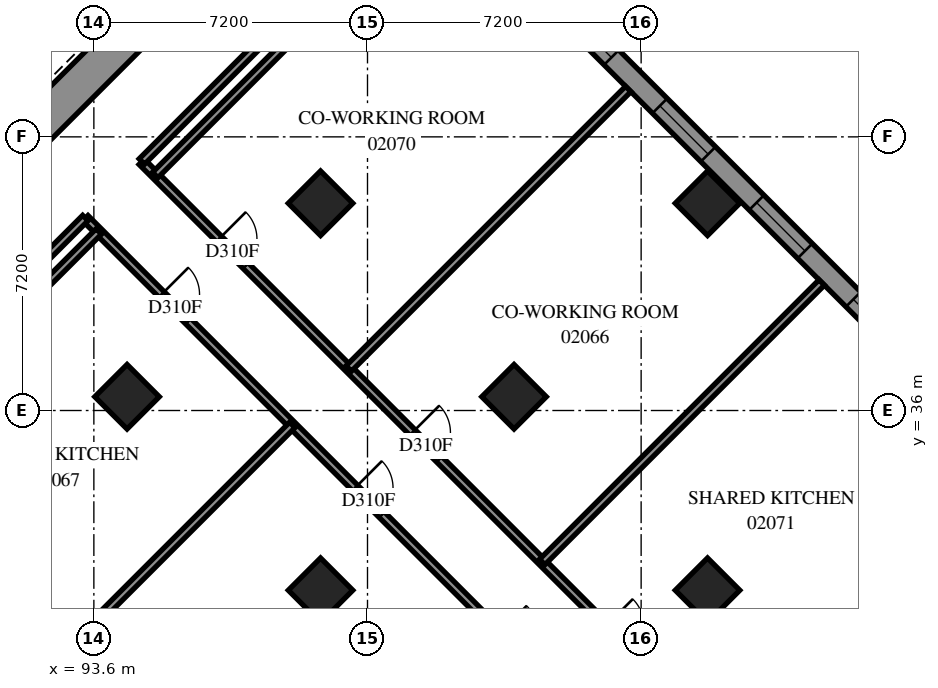
"""IFC4 building model, lengths in metres.
Left out: names, types, materials, properties, quantities, classifications, styles, units other than length and angle.
Written with IfcOpenShell. Run it as: python <this file> out.ifc"""

import sys

from ifc_helpers import new_model, si_unit, direction, frame, frame_2d, origin, origin_2d, place, context, subcontext, project, spatial, polyline, rectangle, outline, extrude, element, fill, save


model = new_model("IFC4")
c1 = context("Model", 3, precision=1e-05, world=origin(), true_north=direction((0.0, 1.0)))
c2 = subcontext(c1, "Body", "Model", "MODEL_VIEW")
j1 = project(units=[si_unit("LENGTHUNIT", "METRE"), si_unit("PLANEANGLEUNIT", "RADIAN")], contexts=[c1])
p1 = place(None, origin())
s1 = spatial("IfcSite", under=j1, at=p1, CompositionType="ELEMENT")
p2 = place(p1, origin())
s2 = spatial("IfcBuilding", under=s1, at=p2, CompositionType="ELEMENT")
p3 = place(p2, frame((0.0, 0.0, 10.2)))
s3 = spatial("IfcBuildingStorey", under=s2, at=p3, CompositionType="ELEMENT", Elevation=10.2)
for number, where, z_axis, x_axis in (
    (1, (99.565, 41.453, 0.0), (0.0, 0.0, 1.0), (0.707, -0.707, 0.0)),
    (2, (94.474, 36.362, 0.0), (0.0, 0.0, 1.0), (0.707, -0.707, 0.0)),
    (3, (109.747, 41.453, 0.0), (0.0, 0.0, 1.0), (0.707, -0.707, 0.0)),
    (4, (104.656, 36.362, 0.0), (0.0, 0.0, 1.0), (0.707, -0.707, 0.0)),
    (5, (99.565, 31.271, 0.0), (0.0, 0.0, 1.0), (0.707, -0.707, 0.0)),
    (6, (109.747, 31.271, 0.0), (0.0, 0.0, 1.0), (0.707, -0.707, 0.0)),
):
    element("IfcColumn", number, at=place(p3, frame(where, z_axis=z_axis, x_axis=x_axis)), inside=s3, PredefinedType="COLUMN", context=c2, shape_type="SweptSolid", body=[
        extrude(rectangle(XDim=1.2, YDim=1.2, at=origin_2d()), origin(), (0.0, 0.0, 1.0), 3.8),
    ])
p4 = place(p3, frame((87.19, 38.554, -0.4), z_axis=(0.0, 0.0, 1.0), x_axis=(0.707103309, 0.7071102534, 0.0)))
e7 = element("IfcWall", 7, at=p4, inside=s3, PredefinedType="SHEAR", context=c2, shape_type="SweptSolid", body=[
    extrude(rectangle(XDim=14.4, YDim=1.0, at=frame_2d((7.2, 0.0))), origin(), (0.0, 0.0, 1.0), 3.5),
])
p5 = place(p4, frame((4.55, 0.0, 0.4)))
e8 = element("IfcOpeningElement", 8, at=p5, cuts=e7, PredefinedType="OPENING", context=c2, shape_type="SweptSolid", body=[
    extrude(rectangle(XDim=1.1, YDim=2.1, at=frame_2d((0.55, 1.05))), frame((0.0, 0.51, 0.0), z_axis=(0.0, -1.0, 0.0), x_axis=(1.0, 0.0, 0.0)), (0.0, 0.0, 1.0), 1.02),
])
p6 = place(p4, frame((11.35, 0.0, 0.4)))
e9 = element("IfcOpeningElement", 9, at=p6, cuts=e7, PredefinedType="OPENING", context=c2, shape_type="SweptSolid", body=[
    extrude(rectangle(XDim=1.1, YDim=2.1, at=frame_2d((0.55, 1.05))), frame((0.0, 0.51, 0.0), z_axis=(0.0, -1.0, 0.0), x_axis=(1.0, 0.0, 0.0)), (0.0, 0.0, 1.0), 1.02),
])
p7 = place(p3, frame((117.843, 34.665, 0.0), z_axis=(0.0, 0.0, 1.0), x_axis=(-0.7071067812, 0.7071067812, 0.0)))
e10 = element("IfcWall", 10, at=p7, inside=s3, PredefinedType="SOLIDWALL", context=c2, shape_type="SweptSolid", body=[
    extrude(outline(polyline([(-0.275, -0.275), (54.222, -0.275), (53.994, 0.275), (0.275, 0.275), (-0.275, -0.275)])), origin(), (0.0, 0.0, 1.0), 3.8),
])
p8 = place(p7, frame((0.8, 0.0, 0.7)))
e11 = element("IfcOpeningElement", 11, at=p8, cuts=e10, PredefinedType="OPENING", context=c2, shape_type="SweptSolid", body=[
    extrude(rectangle(XDim=1.8, YDim=2.6, at=frame_2d((0.9, 1.3))), frame((0.0, 0.285, 0.0), z_axis=(0.0, -1.0, 0.0), x_axis=(1.0, 0.0, 0.0)), (0.0, 0.0, 1.0), 0.57),
])
p9 = place(p7, frame((4.225, 0.0, 0.7)))
e12 = element("IfcOpeningElement", 12, at=p9, cuts=e10, PredefinedType="OPENING", context=c2, shape_type="SweptSolid", body=[
    extrude(rectangle(XDim=1.8, YDim=2.6, at=frame_2d((0.9, 1.3))), frame((0.0, 0.285, 0.0), z_axis=(0.0, -1.0, 0.0), x_axis=(1.0, 0.0, 0.0)), (0.0, 0.0, 1.0), 0.57),
])
p10 = place(p7, frame((7.825, 0.0, 0.7)))
e13 = element("IfcOpeningElement", 13, at=p10, cuts=e10, PredefinedType="OPENING", context=c2, shape_type="SweptSolid", body=[
    extrude(rectangle(XDim=1.8, YDim=2.6, at=frame_2d((0.9, 1.3))), frame((0.0, 0.285, 0.0), z_axis=(0.0, -1.0, 0.0), x_axis=(1.0, 0.0, 0.0)), (0.0, 0.0, 1.0), 0.57),
])
p11 = place(p7, frame((11.425, 0.0, 0.7)))
e14 = element("IfcOpeningElement", 14, at=p11, cuts=e10, PredefinedType="OPENING", context=c2, shape_type="SweptSolid", body=[
    extrude(rectangle(XDim=1.8, YDim=2.6, at=frame_2d((0.9, 1.3))), frame((0.0, 0.285, 0.0), z_axis=(0.0, -1.0, 0.0), x_axis=(1.0, 0.0, 0.0)), (0.0, 0.0, 1.0), 0.57),
])
p12 = place(p7, frame((15.025, 0.0, 0.7)))
e15 = element("IfcOpeningElement", 15, at=p12, cuts=e10, PredefinedType="OPENING", context=c2, shape_type="SweptSolid", body=[
    extrude(rectangle(XDim=1.8, YDim=2.6, at=frame_2d((0.9, 1.3))), frame((0.0, 0.285, 0.0), z_axis=(0.0, -1.0, 0.0), x_axis=(1.0, 0.0, 0.0)), (0.0, 0.0, 1.0), 0.57),
])
p13 = place(p7, frame((18.625, 0.0, 0.7)))
e16 = element("IfcOpeningElement", 16, at=p13, cuts=e10, PredefinedType="OPENING", context=c2, shape_type="SweptSolid", body=[
    extrude(rectangle(XDim=1.8, YDim=2.6, at=frame_2d((0.9, 1.3))), frame((0.0, 0.285, 0.0), z_axis=(0.0, -1.0, 0.0), x_axis=(1.0, 0.0, 0.0)), (0.0, 0.0, 1.0), 0.57),
])
p14 = place(p7, frame((22.225, 0.0, 0.7)))
e17 = element("IfcOpeningElement", 17, at=p14, cuts=e10, PredefinedType="OPENING", context=c2, shape_type="SweptSolid", body=[
    extrude(rectangle(XDim=1.8, YDim=2.6, at=frame_2d((0.9, 1.3))), frame((0.0, 0.285, 0.0), z_axis=(0.0, -1.0, 0.0), x_axis=(1.0, 0.0, 0.0)), (0.0, 0.0, 1.0), 0.57),
])
p15 = place(p7, frame((25.825, 0.0, 0.7)))
e18 = element("IfcOpeningElement", 18, at=p15, cuts=e10, PredefinedType="OPENING", context=c2, shape_type="SweptSolid", body=[
    extrude(rectangle(XDim=1.8, YDim=2.6, at=frame_2d((0.9, 1.3))), frame((0.0, 0.285, 0.0), z_axis=(0.0, -1.0, 0.0), x_axis=(1.0, 0.0, 0.0)), (0.0, 0.0, 1.0), 0.57),
])
p16 = place(p7, frame((29.425, 0.0, 0.7)))
e19 = element("IfcOpeningElement", 19, at=p16, cuts=e10, PredefinedType="OPENING", context=c2, shape_type="SweptSolid", body=[
    extrude(rectangle(XDim=1.8, YDim=2.6, at=frame_2d((0.9, 1.3))), frame((0.0, 0.285, 0.0), z_axis=(0.0, -1.0, 0.0), x_axis=(1.0, 0.0, 0.0)), (0.0, 0.0, 1.0), 0.57),
])
p17 = place(p7, frame((33.025, 0.0, 0.7)))
e20 = element("IfcOpeningElement", 20, at=p17, cuts=e10, PredefinedType="OPENING", context=c2, shape_type="SweptSolid", body=[
    extrude(rectangle(XDim=1.8, YDim=2.6, at=frame_2d((0.9, 1.3))), frame((0.0, 0.285, 0.0), z_axis=(0.0, -1.0, 0.0), x_axis=(1.0, 0.0, 0.0)), (0.0, 0.0, 1.0), 0.57),
])
p18 = place(p7, frame((36.625, 0.0, 0.7)))
e21 = element("IfcOpeningElement", 21, at=p18, cuts=e10, PredefinedType="OPENING", context=c2, shape_type="SweptSolid", body=[
    extrude(rectangle(XDim=1.8, YDim=2.6, at=frame_2d((0.9, 1.3))), frame((0.0, 0.285, 0.0), z_axis=(0.0, -1.0, 0.0), x_axis=(1.0, 0.0, 0.0)), (0.0, 0.0, 1.0), 0.57),
])
p19 = place(p7, frame((40.225, 0.0, 0.7)))
e22 = element("IfcOpeningElement", 22, at=p19, cuts=e10, PredefinedType="OPENING", context=c2, shape_type="SweptSolid", body=[
    extrude(rectangle(XDim=1.8, YDim=2.6, at=frame_2d((0.9, 1.3))), frame((0.0, 0.285, 0.0), z_axis=(0.0, -1.0, 0.0), x_axis=(1.0, 0.0, 0.0)), (0.0, 0.0, 1.0), 0.57),
])
p20 = place(p7, frame((43.825, 0.0, 0.7)))
e23 = element("IfcOpeningElement", 23, at=p20, cuts=e10, PredefinedType="OPENING", context=c2, shape_type="SweptSolid", body=[
    extrude(rectangle(XDim=1.8, YDim=2.6, at=frame_2d((0.9, 1.3))), frame((0.0, 0.285, 0.0), z_axis=(0.0, -1.0, 0.0), x_axis=(1.0, 0.0, 0.0)), (0.0, 0.0, 1.0), 0.57),
])
p21 = place(p7, frame((47.425, 0.0, 0.7)))
e24 = element("IfcOpeningElement", 24, at=p21, cuts=e10, PredefinedType="OPENING", context=c2, shape_type="SweptSolid", body=[
    extrude(rectangle(XDim=1.8, YDim=2.6, at=frame_2d((0.9, 1.3))), frame((0.0, 0.285, 0.0), z_axis=(0.0, -1.0, 0.0), x_axis=(1.0, 0.0, 0.0)), (0.0, 0.0, 1.0), 0.57),
])
p22 = place(p7, frame((50.96, 0.0, 0.7)))
e25 = element("IfcOpeningElement", 25, at=p22, cuts=e10, PredefinedType="OPENING", context=c2, shape_type="SweptSolid", body=[
    extrude(rectangle(XDim=1.8, YDim=2.6, at=frame_2d((0.9, 1.3))), frame((0.0, 0.285, 0.0), z_axis=(0.0, -1.0, 0.0), x_axis=(1.0, 0.0, 0.0)), (0.0, 0.0, 1.0), 0.57),
])
p23 = place(p3, frame((77.07, 42.275, 0.0), z_axis=(0.0, 0.0, 1.0), x_axis=(0.7071067812, -0.7071067812, 0.0)))
e26 = element("IfcWall", 26, at=p23, inside=s3, PredefinedType="SOLIDWALL", context=c2, shape_type="SweptSolid", body=[
    extrude(outline(polyline([(0.114, -0.275), (39.288, -0.275), (38.737, 0.275), (-0.114, 0.275), (0.114, -0.275)])), origin(), (0.0, 0.0, 1.0), 3.8),
])
p24 = place(p23, frame((2.837, 0.0, 0.7)))
e27 = element("IfcOpeningElement", 27, at=p24, cuts=e26, PredefinedType="OPENING", context=c2, shape_type="SweptSolid", body=[
    extrude(rectangle(XDim=1.8, YDim=2.6, at=frame_2d((0.9, 1.3))), frame((0.0, 0.285, 0.0), z_axis=(0.0, -1.0, 0.0), x_axis=(1.0, 0.0, 0.0)), (0.0, 0.0, 1.0), 0.57),
])
p25 = place(p23, frame((6.588, 0.0, 0.7)))
e28 = element("IfcOpeningElement", 28, at=p25, cuts=e26, PredefinedType="OPENING", context=c2, shape_type="SweptSolid", body=[
    extrude(rectangle(XDim=1.8, YDim=2.6, at=frame_2d((0.9, 1.3))), frame((0.0, 0.285, 0.0), z_axis=(0.0, -1.0, 0.0), x_axis=(1.0, 0.0, 0.0)), (0.0, 0.0, 1.0), 0.57),
])
p26 = place(p23, frame((10.188, 0.0, 0.7)))
e29 = element("IfcOpeningElement", 29, at=p26, cuts=e26, PredefinedType="OPENING", context=c2, shape_type="SweptSolid", body=[
    extrude(rectangle(XDim=1.8, YDim=2.6, at=frame_2d((0.9, 1.3))), frame((0.0, 0.285, 0.0), z_axis=(0.0, -1.0, 0.0), x_axis=(1.0, 0.0, 0.0)), (0.0, 0.0, 1.0), 0.57),
])
p27 = place(p23, frame((13.787, 0.0, 0.7)))
e30 = element("IfcOpeningElement", 30, at=p27, cuts=e26, PredefinedType="OPENING", context=c2, shape_type="SweptSolid", body=[
    extrude(rectangle(XDim=1.8, YDim=2.6, at=frame_2d((0.9, 1.3))), frame((0.0, 0.285, 0.0), z_axis=(0.0, -1.0, 0.0), x_axis=(1.0, 0.0, 0.0)), (0.0, 0.0, 1.0), 0.57),
])
p28 = place(p23, frame((17.387, 0.0, 0.7)))
e31 = element("IfcOpeningElement", 31, at=p28, cuts=e26, PredefinedType="OPENING", context=c2, shape_type="SweptSolid", body=[
    extrude(rectangle(XDim=1.8, YDim=2.6, at=frame_2d((0.9, 1.3))), frame((0.0, 0.285, 0.0), z_axis=(0.0, -1.0, 0.0), x_axis=(1.0, 0.0, 0.0)), (0.0, 0.0, 1.0), 0.57),
])
p29 = place(p23, frame((20.988, 0.0, 0.7)))
e32 = element("IfcOpeningElement", 32, at=p29, cuts=e26, PredefinedType="OPENING", context=c2, shape_type="SweptSolid", body=[
    extrude(rectangle(XDim=1.8, YDim=2.6, at=frame_2d((0.9, 1.3))), frame((0.0, 0.285, 0.0), z_axis=(0.0, -1.0, 0.0), x_axis=(1.0, 0.0, 0.0)), (0.0, 0.0, 1.0), 0.57),
])
p30 = place(p23, frame((24.587, 0.0, 0.7)))
e33 = element("IfcOpeningElement", 33, at=p30, cuts=e26, PredefinedType="OPENING", context=c2, shape_type="SweptSolid", body=[
    extrude(rectangle(XDim=1.8, YDim=2.6, at=frame_2d((0.9, 1.3))), frame((0.0, 0.285, 0.0), z_axis=(0.0, -1.0, 0.0), x_axis=(1.0, 0.0, 0.0)), (0.0, 0.0, 1.0), 0.57),
])
p31 = place(p23, frame((28.188, 0.0, 0.7)))
e34 = element("IfcOpeningElement", 34, at=p31, cuts=e26, PredefinedType="OPENING", context=c2, shape_type="SweptSolid", body=[
    extrude(rectangle(XDim=1.8, YDim=2.6, at=frame_2d((0.9, 1.3))), frame((0.0, 0.285, 0.0), z_axis=(0.0, -1.0, 0.0), x_axis=(1.0, 0.0, 0.0)), (0.0, 0.0, 1.0), 0.57),
])
p32 = place(p23, frame((31.788, 0.0, 0.7)))
e35 = element("IfcOpeningElement", 35, at=p32, cuts=e26, PredefinedType="OPENING", context=c2, shape_type="SweptSolid", body=[
    extrude(rectangle(XDim=1.8, YDim=2.6, at=frame_2d((0.9, 1.3))), frame((0.0, 0.285, 0.0), z_axis=(0.0, -1.0, 0.0), x_axis=(1.0, 0.0, 0.0)), (0.0, 0.0, 1.0), 0.57),
])
p33 = place(p23, frame((35.388, 0.0, 0.7)))
e36 = element("IfcOpeningElement", 36, at=p33, cuts=e26, PredefinedType="OPENING", context=c2, shape_type="SweptSolid", body=[
    extrude(rectangle(XDim=1.8, YDim=2.6, at=frame_2d((0.9, 1.3))), frame((0.0, 0.285, 0.0), z_axis=(0.0, -1.0, 0.0), x_axis=(1.0, 0.0, 0.0)), (0.0, 0.0, 1.0), 0.57),
])
p34 = place(p3, frame((94.861, 42.544, 0.0), z_axis=(0.0, 0.0, 1.0), x_axis=(0.7071067812, -0.7071067812, 0.0)))
e37 = element("IfcWall", 37, at=p34, inside=s3, PredefinedType="PARTITIONING", context=c2, shape_type="SweptSolid", body=[
    extrude(rectangle(XDim=25.699, YDim=0.2, at=frame_2d((12.85, 0.0))), origin(), (0.0, 0.0, 1.0), 3.8),
])
p35 = place(p34, frame((10.072, 0.0, 0.0)))
e38 = element("IfcOpeningElement", 38, at=p35, cuts=e37, PredefinedType="OPENING", context=c2, shape_type="SweptSolid", body=[
    extrude(rectangle(XDim=1.0, YDim=2.1, at=frame_2d((0.5, 1.05))), frame((0.0, 0.11, 0.0), z_axis=(0.0, -1.0, 0.0), x_axis=(1.0, 0.0, 0.0)), (0.0, 0.0, 1.0), 0.22),
])
p36 = place(p34, frame((2.872, 0.0, 0.0)))
e39 = element("IfcOpeningElement", 39, at=p36, cuts=e37, PredefinedType="OPENING", context=c2, shape_type="SweptSolid", body=[
    extrude(rectangle(XDim=1.0, YDim=2.1, at=frame_2d((0.5, 1.05))), frame((0.0, 0.11, 0.0), z_axis=(0.0, -1.0, 0.0), x_axis=(1.0, 0.0, 0.0)), (0.0, 0.0, 1.0), 0.22),
])
p37 = place(p34, frame((17.272, 0.0, 0.0)))
e40 = element("IfcOpeningElement", 40, at=p37, cuts=e37, PredefinedType="OPENING", context=c2, shape_type="SweptSolid", body=[
    extrude(rectangle(XDim=1.0, YDim=2.1, at=frame_2d((0.5, 1.05))), frame((0.0, 0.11, 0.0), z_axis=(0.0, -1.0, 0.0), x_axis=(1.0, 0.0, 0.0)), (0.0, 0.0, 1.0), 0.22),
])
p38 = place(p34, frame((22.606, 0.0, 0.0)))
e41 = element("IfcOpeningElement", 41, at=p38, cuts=e37, PredefinedType="OPENING", context=c2, shape_type="SweptSolid", body=[
    extrude(rectangle(XDim=1.0, YDim=2.1, at=frame_2d((0.5, 1.05))), frame((0.0, 0.11, 0.0), z_axis=(0.0, -1.0, 0.0), x_axis=(1.0, 0.0, 0.0)), (0.0, 0.0, 1.0), 0.22),
])
p39 = place(p3, frame((93.375, 41.061, 0.0), z_axis=(0.0, 0.0, 1.0), x_axis=(0.7071067812, -0.7071067812, 0.0)))
e42 = element("IfcWall", 42, at=p39, inside=s3, PredefinedType="PARTITIONING", context=c2, shape_type="SweptSolid", body=[
    extrude(rectangle(XDim=25.699, YDim=0.2, at=frame_2d((12.85, 0.0))), origin(), (0.0, 0.0, 1.0), 3.8),
])
p40 = place(p39, frame((2.837, 0.0, 0.0)))
e43 = element("IfcOpeningElement", 43, at=p40, cuts=e42, PredefinedType="OPENING", context=c2, shape_type="SweptSolid", body=[
    extrude(rectangle(XDim=1.0, YDim=2.1, at=frame_2d((0.5, 1.05))), frame((0.0, 0.11, 0.0), z_axis=(0.0, -1.0, 0.0), x_axis=(1.0, 0.0, 0.0)), (0.0, 0.0, 1.0), 0.22),
])
p41 = place(p39, frame((10.037, 0.0, 0.0)))
e44 = element("IfcOpeningElement", 44, at=p41, cuts=e42, PredefinedType="OPENING", context=c2, shape_type="SweptSolid", body=[
    extrude(rectangle(XDim=1.0, YDim=2.1, at=frame_2d((0.5, 1.05))), frame((0.0, 0.11, 0.0), z_axis=(0.0, -1.0, 0.0), x_axis=(1.0, 0.0, 0.0)), (0.0, 0.0, 1.0), 0.22),
])
p42 = place(p39, frame((15.425, 0.0, 0.0)))
e45 = element("IfcOpeningElement", 45, at=p42, cuts=e42, PredefinedType="OPENING", context=c2, shape_type="SweptSolid", body=[
    extrude(rectangle(XDim=1.0, YDim=2.1, at=frame_2d((0.5, 1.05))), frame((0.0, 0.11, 0.0), z_axis=(0.0, -1.0, 0.0), x_axis=(1.0, 0.0, 0.0)), (0.0, 0.0, 1.0), 0.22),
])
p43 = place(p39, frame((22.057, 0.0, 0.0)))
e46 = element("IfcOpeningElement", 46, at=p43, cuts=e42, PredefinedType="OPENING", context=c2, shape_type="SweptSolid", body=[
    extrude(rectangle(XDim=1.0, YDim=2.1, at=frame_2d((0.5, 1.05))), frame((0.0, 0.11, 0.0), z_axis=(0.0, -1.0, 0.0), x_axis=(1.0, 0.0, 0.0)), (0.0, 0.0, 1.0), 0.22),
])
for number, where, z_axis, x_axis in (
    (47, (86.376, 33.357, 0.0), (0.0, 0.0, 1.0), (0.707, 0.707, 0.0)),
    (48, (91.468, 28.266, 0.0), (0.0, 0.0, 1.0), (0.707, 0.707, 0.0)),
):
    element("IfcWall", number, at=place(p3, frame(where, z_axis=z_axis, x_axis=x_axis)), inside=s3, PredefinedType="PARTITIONING", context=c2, shape_type="SweptSolid", body=[
        extrude(rectangle(XDim=10.4, YDim=0.2, at=frame_2d((5.2, 0.0))), origin(), (0.0, 0.0, 1.0), 3.8),
    ])
for number, where, z_axis, x_axis in (
    (49, (105.398, 32.014, 0.0), (0.0, 0.0, 1.0), (0.707, 0.707, 0.0)),
    (50, (100.307, 37.105, 0.0), (0.0, 0.0, 1.0), (0.707, 0.707, 0.0)),
    (51, (95.215, 42.197, 0.0), (0.0, 0.0, 1.0), (0.707, 0.707, 0.0)),
):
    element("IfcWall", number, at=place(p3, frame(where, z_axis=z_axis, x_axis=x_axis)), inside=s3, PredefinedType="PARTITIONING", context=c2, shape_type="SweptSolid", body=[
        extrude(rectangle(XDim=10.4, YDim=0.2, at=frame_2d((5.2, 0.0))), origin(), (0.0, 0.0, 1.0), 3.8),
    ])
for number, where, z_axis, x_axis in (
    (52, (86.836, 34.524, 0.0), (0.0, 0.0, 1.0), (0.707, 0.707, 0.0)),
    (53, (94.863, 42.551, 0.0), (0.0, 0.0, 1.0), (0.707, 0.707, 0.0)),
):
    element("IfcWall", number, at=place(p3, frame(where, z_axis=z_axis, x_axis=x_axis)), inside=s3, PredefinedType="PARTITIONING", context=c2, shape_type="SweptSolid", body=[
        extrude(rectangle(XDim=9.249, YDim=0.2, at=frame_2d((4.625, 0.0))), origin(), (0.0, 0.0, 1.0), 3.8),
    ])
p44 = place(p3, frame((110.489, 26.923, 0.0), z_axis=(0.0, 0.0, 1.0), x_axis=(0.7071067812, 0.7071067812, 0.0)))
e54 = element("IfcWall", 54, at=p44, inside=s3, PredefinedType="PARTITIONING", context=c2, shape_type="SweptSolid", body=[
    extrude(rectangle(XDim=5.6, YDim=0.2, at=frame_2d((2.8, 0.0))), origin(), (0.0, 0.0, 1.0), 3.8),
])
p45 = place(p9, origin())
e55 = element("IfcWindow", 55, at=p45, inside=s3, PartitioningType="SINGLE_PANEL", PredefinedType="WINDOW", context=c2, shape_type="SweptSolid", body=[
    extrude(rectangle(XDim=1.8, YDim=2.6, at=frame_2d((0.9, 1.3))), frame((0.0, 0.155, 0.0), z_axis=(0.0, -1.0, 0.0), x_axis=(1.0, 0.0, 0.0)), (0.0, 0.0, 1.0), 0.06),
])
fill(e12, e55)
p46 = place(p10, origin())
e56 = element("IfcWindow", 56, at=p46, inside=s3, PartitioningType="SINGLE_PANEL", PredefinedType="WINDOW", context=c2, shape_type="SweptSolid", body=[
    extrude(rectangle(XDim=1.8, YDim=2.6, at=frame_2d((0.9, 1.3))), frame((0.0, 0.155, 0.0), z_axis=(0.0, -1.0, 0.0), x_axis=(1.0, 0.0, 0.0)), (0.0, 0.0, 1.0), 0.06),
])
fill(e13, e56)
p47 = place(p11, origin())
e57 = element("IfcWindow", 57, at=p47, inside=s3, PartitioningType="SINGLE_PANEL", PredefinedType="WINDOW", context=c2, shape_type="SweptSolid", body=[
    extrude(rectangle(XDim=1.8, YDim=2.6, at=frame_2d((0.9, 1.3))), frame((0.0, 0.155, 0.0), z_axis=(0.0, -1.0, 0.0), x_axis=(1.0, 0.0, 0.0)), (0.0, 0.0, 1.0), 0.06),
])
fill(e14, e57)
p48 = place(p12, origin())
e58 = element("IfcWindow", 58, at=p48, inside=s3, PartitioningType="SINGLE_PANEL", PredefinedType="WINDOW", context=c2, shape_type="SweptSolid", body=[
    extrude(rectangle(XDim=1.8, YDim=2.6, at=frame_2d((0.9, 1.3))), frame((0.0, 0.155, 0.0), z_axis=(0.0, -1.0, 0.0), x_axis=(1.0, 0.0, 0.0)), (0.0, 0.0, 1.0), 0.06),
])
fill(e15, e58)
p49 = place(p35, origin())
e59 = element("IfcDoor", 59, at=p49, inside=s3, OperationType="SINGLE_SWING_RIGHT", PredefinedType="DOOR", context=c2, shape_type="SweptSolid", body=[
    extrude(rectangle(XDim=1.0, YDim=2.1, at=frame_2d((0.5, 1.05))), frame((0.0, 0.025, 0.0), z_axis=(0.0, -1.0, 0.0), x_axis=(1.0, 0.0, 0.0)), (0.0, 0.0, 1.0), 0.05),
])
fill(e38, e59)
p50 = place(p40, origin())
e60 = element("IfcDoor", 60, at=p50, inside=s3, OperationType="SINGLE_SWING_LEFT", PredefinedType="DOOR", context=c2, shape_type="SweptSolid", body=[
    extrude(rectangle(XDim=1.0, YDim=2.1, at=frame_2d((0.5, 1.05))), frame((0.0, 0.025, 0.0), z_axis=(0.0, -1.0, 0.0), x_axis=(1.0, 0.0, 0.0)), (0.0, 0.0, 1.0), 0.05),
])
fill(e43, e60)
p51 = place(p41, origin())
e61 = element("IfcDoor", 61, at=p51, inside=s3, OperationType="SINGLE_SWING_LEFT", PredefinedType="DOOR", context=c2, shape_type="SweptSolid", body=[
    extrude(rectangle(XDim=1.0, YDim=2.1, at=frame_2d((0.5, 1.05))), frame((0.0, 0.025, 0.0), z_axis=(0.0, -1.0, 0.0), x_axis=(1.0, 0.0, 0.0)), (0.0, 0.0, 1.0), 0.05),
])
fill(e44, e61)
p52 = place(p36, origin())
e62 = element("IfcDoor", 62, at=p52, inside=s3, OperationType="SINGLE_SWING_RIGHT", PredefinedType="DOOR", context=c2, shape_type="SweptSolid", body=[
    extrude(rectangle(XDim=1.0, YDim=2.1, at=frame_2d((0.5, 1.05))), frame((0.0, 0.025, 0.0), z_axis=(0.0, -1.0, 0.0), x_axis=(1.0, 0.0, 0.0)), (0.0, 0.0, 1.0), 0.05),
])
fill(e39, e62)
save(model, sys.argv[1])
